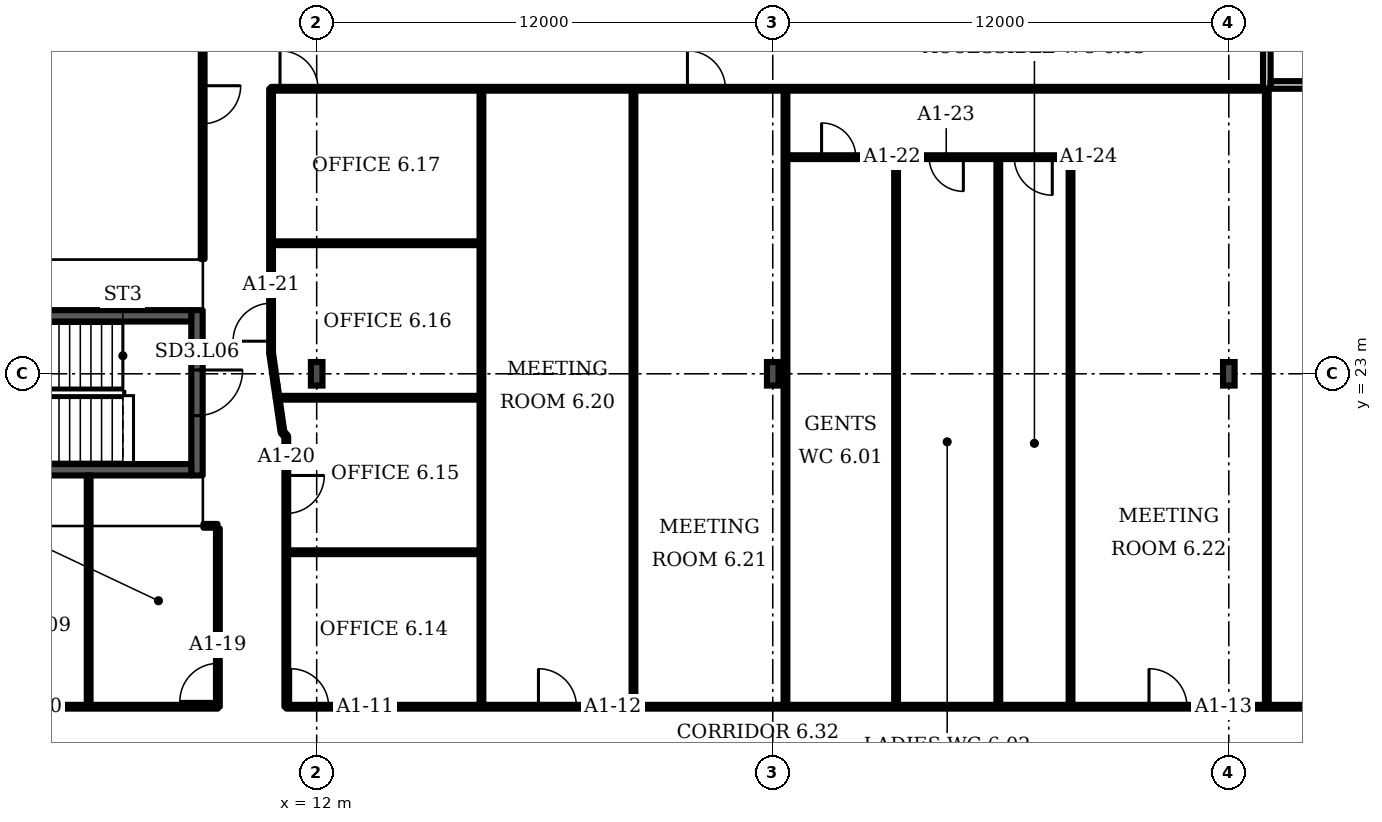
"""IFC4 building model, lengths in metres.
Left out: names, types, materials, properties, quantities, classifications, styles, units other than length and angle.
Written with IfcOpenShell. Run it as: python <this file> out.ifc"""

import sys

from ifc_helpers import new_model, si_unit, direction, frame, frame_2d, origin, origin_2d, place, context, subcontext, project, spatial, rectangle, i_section, extrude, element, fill, save


model = new_model("IFC4")
c1 = context("Model", 3, precision=1e-05, world=origin(), true_north=direction((0.0, 1.0)))
c2 = subcontext(c1, "Body", "Model", "MODEL_VIEW")
j1 = project(units=[si_unit("LENGTHUNIT", "METRE"), si_unit("PLANEANGLEUNIT", "RADIAN")], contexts=[c1])
p1 = place(None, origin())
s1 = spatial("IfcSite", under=j1, at=p1, CompositionType="ELEMENT")
p2 = place(p1, origin())
s2 = spatial("IfcBuilding", under=s1, at=p2, CompositionType="ELEMENT")
p3 = place(p2, frame((0.0, 0.0, 41.5)))
s3 = spatial("IfcBuildingStorey", under=s2, at=p3, CompositionType="ELEMENT", Elevation=41.5)
for number, where, z_axis, x_axis in (
    (1, (12.0, 23.0, 0.0), (0.0, 0.0, 1.0), (1.0, 0.0, 0.0)),
    (2, (24.0, 23.0, 0.0), (0.0, 0.0, 1.0), (1.0, 0.0, 0.0)),
    (3, (36.0, 23.0, 0.0), (0.0, 0.0, 1.0), (1.0, 0.0, 0.0)),
):
    element("IfcColumn", number, at=place(p3, frame(where, z_axis=z_axis, x_axis=x_axis)), inside=s3, PredefinedType="COLUMN", context=c2, shape_type="SweptSolid", body=[
        extrude(i_section(OverallWidth=0.305, OverallDepth=0.62, WebThickness=0.021, FlangeThickness=0.04, FilletRadius=0.027, at=origin_2d()), origin(), (0.0, 0.0, 1.0), 3.6),
    ])
p4 = place(p3, frame((37.0, 30.5, 0.0), z_axis=(0.0, 0.0, 1.0), x_axis=(0.0, 1.0, 0.0)))
e4 = element("IfcWall", 4, at=p4, inside=s3, PredefinedType="PARTITIONING", context=c2, shape_type="SweptSolid", body=[
    extrude(rectangle(XDim=3.5, YDim=0.2, at=frame_2d((1.75, 0.0))), origin(), (0.0, 0.0, 1.0), 3.2),
])
p5 = place(p4, frame((1.2, 0.0, 0.0)))
e5 = element("IfcOpeningElement", 5, at=p5, cuts=e4, PredefinedType="OPENING", context=c2, shape_type="SweptSolid", body=[
    extrude(rectangle(XDim=1.1, YDim=2.1, at=frame_2d((0.55, 1.05))), frame((0.0, 0.11, 0.0), z_axis=(0.0, -1.0, 0.0), x_axis=(1.0, 0.0, 0.0)), (0.0, 0.0, 1.0), 0.22),
])
p6 = place(p3, frame((37.1, 30.6, 0.0), z_axis=(0.0, 0.0, 1.0), x_axis=(1.0, 0.0, 0.0)))
e6 = element("IfcWall", 6, at=p6, inside=s3, PredefinedType="PARTITIONING", context=c2, shape_type="SweptSolid", body=[
    extrude(rectangle(XDim=2.8, YDim=0.2, at=frame_2d((1.4, 0.0))), origin(), (0.0, 0.0, 1.0), 3.2),
])
p7 = place(p3, frame((8.85, 20.325, 0.0), z_axis=(0.0, 0.0, 1.0), x_axis=(0.0, 1.0, 0.0)))
e7 = element("IfcWall", 7, at=p7, inside=s3, PredefinedType="SHEAR", context=c2, shape_type="SweptSolid", body=[
    extrude(rectangle(XDim=4.35, YDim=0.3, at=frame_2d((2.175, 0.0))), origin(), (0.0, 0.0, 1.0), 3.2),
])
p8 = place(p7, frame((1.575, 0.0, 0.0)))
e8 = element("IfcOpeningElement", 8, at=p8, cuts=e7, PredefinedType="OPENING", context=c2, shape_type="SweptSolid", body=[
    extrude(rectangle(XDim=1.2, YDim=2.1, at=frame_2d((0.6, 1.05))), frame((0.0, 0.16, 0.0), z_axis=(0.0, -1.0, 0.0), x_axis=(1.0, 0.0, 0.0)), (0.0, 0.0, 1.0), 0.32),
])
p9 = place(p3, frame((0.02, 14.24, 0.0), z_axis=(0.0, 0.0, 1.0), x_axis=(1.0, 0.0, 0.0)))
e9 = element("IfcWall", 9, at=p9, inside=s3, PredefinedType="PARTITIONING", context=c2, shape_type="SweptSolid", body=[
    extrude(rectangle(XDim=9.38, YDim=0.1, at=frame_2d((4.69, 0.0))), origin(), (0.0, 0.0, 1.0), 3.2),
])
p10 = place(p9, frame((2.56, 0.0, 0.0)))
e10 = element("IfcOpeningElement", 10, at=p10, cuts=e9, PredefinedType="OPENING", context=c2, shape_type="SweptSolid", body=[
    extrude(rectangle(XDim=1.0, YDim=2.1, at=frame_2d((0.5, 1.05))), frame((0.0, 0.06, 0.0), z_axis=(0.0, -1.0, 0.0), x_axis=(1.0, 0.0, 0.0)), (0.0, 0.0, 1.0), 0.12),
])
p11 = place(p3, frame((6.0, 14.24, 0.0), z_axis=(0.0, 0.0, 1.0), x_axis=(0.0, 1.0, 0.0)))
e11 = element("IfcWall", 11, at=p11, inside=s3, PredefinedType="PARTITIONING", context=c2, shape_type="SweptSolid", body=[
    extrude(rectangle(XDim=6.085, YDim=0.1, at=frame_2d((3.042, 0.0))), origin(), (0.0, 0.0, 1.0), 3.2),
])
p12 = place(p3, frame((9.0, 26.02, 0.0), z_axis=(0.0, 0.0, 1.0), x_axis=(0.0, 1.0, 0.0)))
e12 = element("IfcWall", 12, at=p12, inside=s3, PredefinedType="PARTITIONING", context=c2, shape_type="SweptSolid", body=[
    extrude(rectangle(XDim=7.96, YDim=0.1, at=frame_2d((3.98, 0.0))), origin(), (0.0, 0.0, 1.0), 3.2),
])
p13 = place(p12, frame((3.56, 0.0, 0.0)))
e13 = element("IfcOpeningElement", 13, at=p13, cuts=e12, PredefinedType="OPENING", context=c2, shape_type="SweptSolid", body=[
    extrude(rectangle(XDim=1.0, YDim=2.1, at=frame_2d((0.5, 1.05))), frame((0.0, 0.06, 0.0), z_axis=(0.0, -1.0, 0.0), x_axis=(1.0, 0.0, 0.0)), (0.0, 0.0, 1.0), 0.12),
])
p14 = place(p3, frame((9.02, 19.0, 0.0), z_axis=(0.0, 0.0, 1.0), x_axis=(1.0, 0.0, 0.0)))
e14 = element("IfcWall", 14, at=p14, inside=s3, PredefinedType="PARTITIONING", context=c2, shape_type="SweptSolid", body=[
    extrude(rectangle(XDim=0.37, YDim=0.1, at=frame_2d((0.185, 0.0))), origin(), (0.0, 0.0, 1.0), 3.2),
])
p15 = place(p3, frame((9.4, 14.24, 0.0), z_axis=(0.0, 0.0, 1.0), x_axis=(0.0, 1.0, 0.0)))
e15 = element("IfcWall", 15, at=p15, inside=s3, PredefinedType="PARTITIONING", context=c2, shape_type="SweptSolid", body=[
    extrude(rectangle(XDim=4.69, YDim=0.1, at=frame_2d((2.345, 0.0))), origin(), (0.0, 0.0, 1.0), 3.2),
])
p16 = place(p15, frame((0.14, 0.0, 0.0)))
e16 = element("IfcOpeningElement", 16, at=p16, cuts=e15, PredefinedType="OPENING", context=c2, shape_type="SweptSolid", body=[
    extrude(rectangle(XDim=1.0, YDim=2.1, at=frame_2d((0.5, 1.05))), frame((0.0, 0.06, 0.0), z_axis=(0.0, -1.0, 0.0), x_axis=(1.0, 0.0, 0.0)), (0.0, 0.0, 1.0), 0.12),
])
p17 = place(p3, frame((10.8, 23.55, 0.0), z_axis=(0.0, 0.0, 1.0), x_axis=(0.0, 1.0, 0.0)))
e17 = element("IfcWall", 17, at=p17, inside=s3, PredefinedType="PARTITIONING", context=c2, shape_type="SweptSolid", body=[
    extrude(rectangle(XDim=6.95, YDim=0.1, at=frame_2d((3.475, 0.0))), origin(), (0.0, 0.0, 1.0), 3.2),
])
p18 = place(p17, frame((0.308, 0.0, 0.0)))
e18 = element("IfcOpeningElement", 18, at=p18, cuts=e17, PredefinedType="OPENING", context=c2, shape_type="SweptSolid", body=[
    extrude(rectangle(XDim=1.0, YDim=2.1, at=frame_2d((0.5, 1.05))), frame((0.0, 0.06, 0.0), z_axis=(0.0, -1.0, 0.0), x_axis=(1.0, 0.0, 0.0)), (0.0, 0.0, 1.0), 0.12),
])
p19 = place(p3, frame((10.8, 26.435, 0.0), z_axis=(0.0, 0.0, 1.0), x_axis=(1.0, 0.0, 0.0)))
e19 = element("IfcWall", 19, at=p19, inside=s3, PredefinedType="PARTITIONING", context=c2, shape_type="SweptSolid", body=[
    extrude(rectangle(XDim=5.535, YDim=0.1, at=frame_2d((2.768, 0.0))), origin(), (0.0, 0.0, 1.0), 3.2),
])
p20 = place(p3, frame((10.8, 30.5, 0.0), z_axis=(0.0, 0.0, 1.0), x_axis=(1.0, 0.0, 0.0)))
e20 = element("IfcWall", 20, at=p20, inside=s3, PredefinedType="PARTITIONING", context=c2, shape_type="SweptSolid", body=[
    extrude(rectangle(XDim=26.05, YDim=0.1, at=frame_2d((13.025, 0.0))), origin(), (0.0, 0.0, 1.0), 3.2),
])
p21 = place(p20, frame((0.235, 0.0, 0.0)))
e21 = element("IfcOpeningElement", 21, at=p21, cuts=e20, PredefinedType="OPENING", context=c2, shape_type="SweptSolid", body=[
    extrude(rectangle(XDim=1.0, YDim=2.1, at=frame_2d((0.5, 1.05))), frame((0.0, 0.06, 0.0), z_axis=(0.0, -1.0, 0.0), x_axis=(1.0, 0.0, 0.0)), (0.0, 0.0, 1.0), 0.12),
])
p22 = place(p20, frame((10.955, 0.0, 0.0)))
e22 = element("IfcOpeningElement", 22, at=p22, cuts=e20, PredefinedType="OPENING", context=c2, shape_type="SweptSolid", body=[
    extrude(rectangle(XDim=1.0, YDim=2.1, at=frame_2d((0.5, 1.05))), frame((0.0, 0.06, 0.0), z_axis=(0.0, -1.0, 0.0), x_axis=(1.0, 0.0, 0.0)), (0.0, 0.0, 1.0), 0.12),
])
p23 = place(p3, frame((10.92, 22.705, 0.0), z_axis=(0.0, 0.0, 1.0), x_axis=(-0.14046, 0.990086, 0.0)))
e23 = element("IfcWall", 23, at=p23, inside=s3, PredefinedType="PARTITIONING", context=c2, shape_type="SweptSolid", body=[
    extrude(rectangle(XDim=0.854, YDim=0.1, at=frame_2d((0.427, 0.0))), origin(), (0.0, 0.0, 1.0), 3.2),
])
p24 = place(p3, frame((10.97, 22.37, 0.0), z_axis=(0.0, 0.0, 1.0), x_axis=(-0.147776, 0.989018, 0.0)))
e24 = element("IfcWall", 24, at=p24, inside=s3, PredefinedType="PARTITIONING", context=c2, shape_type="SweptSolid", body=[
    extrude(rectangle(XDim=0.339, YDim=0.1, at=frame_2d((0.169, 0.0))), origin(), (0.0, 0.0, 1.0), 3.2),
])
p25 = place(p3, frame((10.97, 22.37, 0.0), z_axis=(0.0, 0.0, 1.0), x_axis=(1.0, 0.0, 0.0)))
e25 = element("IfcWall", 25, at=p25, inside=s3, PredefinedType="PARTITIONING", context=c2, shape_type="SweptSolid", body=[
    extrude(rectangle(XDim=5.365, YDim=0.1, at=frame_2d((2.683, 0.0))), origin(), (0.0, 0.0, 1.0), 3.2),
])
p26 = place(p3, frame((11.1, 21.465, 0.0), z_axis=(0.0, 0.0, 1.0), x_axis=(-0.142318, 0.989818, 0.0)))
e26 = element("IfcWall", 26, at=p26, inside=s3, PredefinedType="PARTITIONING", context=c2, shape_type="SweptSolid", body=[
    extrude(rectangle(XDim=0.914, YDim=0.1, at=frame_2d((0.457, 0.0))), origin(), (0.0, 0.0, 1.0), 3.2),
])
p27 = place(p3, frame((11.2, 14.24, 0.0), z_axis=(0.0, 0.0, 1.0), x_axis=(0.0, 1.0, 0.0)))
e27 = element("IfcWall", 27, at=p27, inside=s3, PredefinedType="PARTITIONING", context=c2, shape_type="SweptSolid", body=[
    extrude(rectangle(XDim=7.11, YDim=0.1, at=frame_2d((3.555, 0.0))), origin(), (0.0, 0.0, 1.0), 3.2),
])
p28 = place(p27, frame((5.085, 0.0, 0.0)))
e28 = element("IfcOpeningElement", 28, at=p28, cuts=e27, PredefinedType="OPENING", context=c2, shape_type="SweptSolid", body=[
    extrude(rectangle(XDim=1.0, YDim=2.1, at=frame_2d((0.5, 1.05))), frame((0.0, 0.06, 0.0), z_axis=(0.0, -1.0, 0.0), x_axis=(1.0, 0.0, 0.0)), (0.0, 0.0, 1.0), 0.12),
])
p29 = place(p3, frame((11.2, 14.24, 0.0), z_axis=(0.0, 0.0, 1.0), x_axis=(1.0, 0.0, 0.0)))
e29 = element("IfcWall", 29, at=p29, inside=s3, PredefinedType="PARTITIONING", context=c2, shape_type="SweptSolid", body=[
    extrude(rectangle(XDim=51.635, YDim=0.1, at=frame_2d((25.817, 0.0))), origin(), (0.0, 0.0, 1.0), 3.2),
])
p30 = place(p29, frame((0.115, 0.0, 0.0)))
e30 = element("IfcOpeningElement", 30, at=p30, cuts=e29, PredefinedType="OPENING", context=c2, shape_type="SweptSolid", body=[
    extrude(rectangle(XDim=1.0, YDim=2.1, at=frame_2d((0.5, 1.05))), frame((0.0, 0.06, 0.0), z_axis=(0.0, -1.0, 0.0), x_axis=(1.0, 0.0, 0.0)), (0.0, 0.0, 1.0), 0.12),
])
p31 = place(p29, frame((6.635, 0.0, 0.0)))
e31 = element("IfcOpeningElement", 31, at=p31, cuts=e29, PredefinedType="OPENING", context=c2, shape_type="SweptSolid", body=[
    extrude(rectangle(XDim=1.0, YDim=2.1, at=frame_2d((0.5, 1.05))), frame((0.0, 0.06, 0.0), z_axis=(0.0, -1.0, 0.0), x_axis=(1.0, 0.0, 0.0)), (0.0, 0.0, 1.0), 0.12),
])
p32 = place(p29, frame((22.7, 0.0, 0.0)))
e32 = element("IfcOpeningElement", 32, at=p32, cuts=e29, PredefinedType="OPENING", context=c2, shape_type="SweptSolid", body=[
    extrude(rectangle(XDim=1.0, YDim=2.1, at=frame_2d((0.5, 1.05))), frame((0.0, 0.06, 0.0), z_axis=(0.0, -1.0, 0.0), x_axis=(1.0, 0.0, 0.0)), (0.0, 0.0, 1.0), 0.12),
])
p33 = place(p29, frame((27.865, 0.0, 0.0)))
e33 = element("IfcOpeningElement", 33, at=p33, cuts=e29, PredefinedType="OPENING", context=c2, shape_type="SweptSolid", body=[
    extrude(rectangle(XDim=1.0, YDim=2.1, at=frame_2d((0.5, 1.05))), frame((0.0, 0.06, 0.0), z_axis=(0.0, -1.0, 0.0), x_axis=(1.0, 0.0, 0.0)), (0.0, 0.0, 1.0), 0.12),
])
p34 = place(p29, frame((34.065, 0.0, 0.0)))
e34 = element("IfcOpeningElement", 34, at=p34, cuts=e29, PredefinedType="OPENING", context=c2, shape_type="SweptSolid", body=[
    extrude(rectangle(XDim=1.8, YDim=2.1, at=frame_2d((0.9, 1.05))), frame((0.0, 0.06, 0.0), z_axis=(0.0, -1.0, 0.0), x_axis=(1.0, 0.0, 0.0)), (0.0, 0.0, 1.0), 0.12),
])
p35 = place(p29, frame((41.765, 0.0, 0.0)))
e35 = element("IfcOpeningElement", 35, at=p35, cuts=e29, PredefinedType="OPENING", context=c2, shape_type="SweptSolid", body=[
    extrude(rectangle(XDim=1.8, YDim=2.1, at=frame_2d((0.9, 1.05))), frame((0.0, 0.06, 0.0), z_axis=(0.0, -1.0, 0.0), x_axis=(1.0, 0.0, 0.0)), (0.0, 0.0, 1.0), 0.12),
])
p36 = place(p3, frame((11.2, 18.305, 0.0), z_axis=(0.0, 0.0, 1.0), x_axis=(1.0, 0.0, 0.0)))
e36 = element("IfcWall", 36, at=p36, inside=s3, PredefinedType="PARTITIONING", context=c2, shape_type="SweptSolid", body=[
    extrude(rectangle(XDim=5.135, YDim=0.1, at=frame_2d((2.567, 0.0))), origin(), (0.0, 0.0, 1.0), 3.2),
])
p37 = place(p3, frame((11.2, 21.35, 0.0), z_axis=(0.0, 0.0, 1.0), x_axis=(-0.65566, 0.755051, 0.0)))
e37 = element("IfcWall", 37, at=p37, inside=s3, PredefinedType="PARTITIONING", context=c2, shape_type="SweptSolid", body=[
    extrude(rectangle(XDim=0.152, YDim=0.1, at=frame_2d((0.076, 0.0))), origin(), (0.0, 0.0, 1.0), 3.2),
])
for number, where, z_axis, x_axis in (
    (38, (16.335, 14.24, 0.0), (0.0, 0.0, 1.0), (0.0, 1.0, 0.0)),
    (39, (20.335, 14.24, 0.0), (0.0, 0.0, 1.0), (0.0, 1.0, 0.0)),
):
    element("IfcWall", number, at=place(p3, frame(where, z_axis=z_axis, x_axis=x_axis)), inside=s3, PredefinedType="PARTITIONING", context=c2, shape_type="SweptSolid", body=[
        extrude(rectangle(XDim=16.26, YDim=0.1, at=frame_2d((8.13, 0.0))), origin(), (0.0, 0.0, 1.0), 3.2),
    ])
p38 = place(p3, frame((24.335, 14.24, 0.0), z_axis=(0.0, 0.0, 1.0), x_axis=(0.0, 1.0, 0.0)))
e40 = element("IfcWall", 40, at=p38, inside=s3, PredefinedType="PARTITIONING", context=c2, shape_type="SweptSolid", body=[
    extrude(rectangle(XDim=16.25, YDim=0.1, at=frame_2d((8.125, 0.0))), origin(), (0.0, 0.0, 1.0), 3.2),
])
p39 = place(p3, frame((24.335, 28.7, 0.0), z_axis=(0.0, 0.0, 1.0), x_axis=(1.0, 0.0, 0.0)))
e41 = element("IfcWall", 41, at=p39, inside=s3, PredefinedType="PARTITIONING", context=c2, shape_type="SweptSolid", body=[
    extrude(rectangle(XDim=7.5, YDim=0.1, at=frame_2d((3.75, 0.0))), origin(), (0.0, 0.0, 1.0), 3.2),
])
p40 = place(p39, frame((0.95, 0.0, 0.0)))
e42 = element("IfcOpeningElement", 42, at=p40, cuts=e41, PredefinedType="OPENING", context=c2, shape_type="SweptSolid", body=[
    extrude(rectangle(XDim=0.9, YDim=2.1, at=frame_2d((0.45, 1.05))), frame((0.0, 0.06, 0.0), z_axis=(0.0, -1.0, 0.0), x_axis=(1.0, 0.0, 0.0)), (0.0, 0.0, 1.0), 0.12),
])
p41 = place(p39, frame((3.78, 0.0, 0.0)))
e43 = element("IfcOpeningElement", 43, at=p41, cuts=e41, PredefinedType="OPENING", context=c2, shape_type="SweptSolid", body=[
    extrude(rectangle(XDim=0.9, YDim=2.1, at=frame_2d((0.45, 1.05))), frame((0.0, 0.06, 0.0), z_axis=(0.0, -1.0, 0.0), x_axis=(1.0, 0.0, 0.0)), (0.0, 0.0, 1.0), 0.12),
])
p42 = place(p39, frame((6.02, 0.0, 0.0)))
e44 = element("IfcOpeningElement", 44, at=p42, cuts=e41, PredefinedType="OPENING", context=c2, shape_type="SweptSolid", body=[
    extrude(rectangle(XDim=1.0, YDim=2.1, at=frame_2d((0.5, 1.05))), frame((0.0, 0.06, 0.0), z_axis=(0.0, -1.0, 0.0), x_axis=(1.0, 0.0, 0.0)), (0.0, 0.0, 1.0), 0.12),
])
for number, where, z_axis, x_axis in (
    (45, (27.245, 14.24, 0.0), (0.0, 0.0, 1.0), (0.0, 1.0, 0.0)),
    (46, (29.935, 14.24, 0.0), (0.0, 0.0, 1.0), (0.0, 1.0, 0.0)),
    (47, (31.835, 14.24, 0.0), (0.0, 0.0, 1.0), (0.0, 1.0, 0.0)),
):
    element("IfcWall", number, at=place(p3, frame(where, z_axis=z_axis, x_axis=x_axis)), inside=s3, PredefinedType="PARTITIONING", context=c2, shape_type="SweptSolid", body=[
        extrude(rectangle(XDim=14.46, YDim=0.1, at=frame_2d((7.23, 0.0))), origin(), (0.0, 0.0, 1.0), 3.2),
    ])
p43 = place(p3, frame((37.0, 14.24, 0.0), z_axis=(0.0, 0.0, 1.0), x_axis=(0.0, 1.0, 0.0)))
e48 = element("IfcWall", 48, at=p43, inside=s3, PredefinedType="PARTITIONING", context=c2, shape_type="SweptSolid", body=[
    extrude(rectangle(XDim=16.26, YDim=0.1, at=frame_2d((8.13, 0.0))), origin(), (0.0, 0.0, 1.0), 3.2),
])
for number, where, z_axis, x_axis in (
    (49, (1.2, 20.475, 0.0), (0.0, 0.0, 1.0), (1.0, 0.0, 0.0)),
    (50, (1.2, 24.525, 0.0), (0.0, 0.0, 1.0), (1.0, 0.0, 0.0)),
):
    element("IfcWall", number, at=place(p3, frame(where, z_axis=z_axis, x_axis=x_axis)), inside=s3, PredefinedType="SHEAR", context=c2, shape_type="SweptSolid", body=[
        extrude(rectangle(XDim=7.5, YDim=0.3, at=frame_2d((3.75, 0.0))), origin(), (0.0, 0.0, 1.0), 3.2),
    ])
p44 = place(p8, origin())
e51 = element("IfcDoor", 51, at=p44, inside=s3, OperationType="SINGLE_SWING_RIGHT", PredefinedType="DOOR", context=c2, shape_type="SweptSolid", body=[
    extrude(rectangle(XDim=1.2, YDim=2.1, at=frame_2d((0.6, 1.05))), frame((0.0, 0.025, 0.0), z_axis=(0.0, -1.0, 0.0), x_axis=(1.0, 0.0, 0.0)), (0.0, 0.0, 1.0), 0.05),
])
fill(e8, e51)
p45 = place(p30, origin())
e52 = element("IfcDoor", 52, at=p45, inside=s3, OperationType="SINGLE_SWING_LEFT", PredefinedType="DOOR", context=c2, shape_type="SweptSolid", body=[
    extrude(rectangle(XDim=1.0, YDim=2.1, at=frame_2d((0.5, 1.05))), frame((0.0, 0.025, 0.0), z_axis=(0.0, -1.0, 0.0), x_axis=(1.0, 0.0, 0.0)), (0.0, 0.0, 1.0), 0.05),
])
fill(e30, e52)
p46 = place(p31, origin())
e53 = element("IfcDoor", 53, at=p46, inside=s3, OperationType="SINGLE_SWING_LEFT", PredefinedType="DOOR", context=c2, shape_type="SweptSolid", body=[
    extrude(rectangle(XDim=1.0, YDim=2.1, at=frame_2d((0.5, 1.05))), frame((0.0, 0.025, 0.0), z_axis=(0.0, -1.0, 0.0), x_axis=(1.0, 0.0, 0.0)), (0.0, 0.0, 1.0), 0.05),
])
fill(e31, e53)
p47 = place(p32, origin())
e54 = element("IfcDoor", 54, at=p47, inside=s3, OperationType="SINGLE_SWING_LEFT", PredefinedType="DOOR", context=c2, shape_type="SweptSolid", body=[
    extrude(rectangle(XDim=1.0, YDim=2.1, at=frame_2d((0.5, 1.05))), frame((0.0, 0.025, 0.0), z_axis=(0.0, -1.0, 0.0), x_axis=(1.0, 0.0, 0.0)), (0.0, 0.0, 1.0), 0.05),
])
fill(e32, e54)
p48 = place(p16, origin())
e55 = element("IfcDoor", 55, at=p48, inside=s3, OperationType="SINGLE_SWING_LEFT", PredefinedType="DOOR", context=c2, shape_type="SweptSolid", body=[
    extrude(rectangle(XDim=1.0, YDim=2.1, at=frame_2d((0.5, 1.05))), frame((0.0, 0.025, 0.0), z_axis=(0.0, -1.0, 0.0), x_axis=(1.0, 0.0, 0.0)), (0.0, 0.0, 1.0), 0.05),
])
fill(e16, e55)
p49 = place(p28, origin())
e56 = element("IfcDoor", 56, at=p49, inside=s3, OperationType="SINGLE_SWING_RIGHT", PredefinedType="DOOR", context=c2, shape_type="SweptSolid", body=[
    extrude(rectangle(XDim=1.0, YDim=2.1, at=frame_2d((0.5, 1.05))), frame((0.0, 0.025, 0.0), z_axis=(0.0, -1.0, 0.0), x_axis=(1.0, 0.0, 0.0)), (0.0, 0.0, 1.0), 0.05),
])
fill(e28, e56)
p50 = place(p18, origin())
e57 = element("IfcDoor", 57, at=p50, inside=s3, OperationType="SINGLE_SWING_LEFT", PredefinedType="DOOR", context=c2, shape_type="SweptSolid", body=[
    extrude(rectangle(XDim=1.0, YDim=2.1, at=frame_2d((0.5, 1.05))), frame((0.0, 0.025, 0.0), z_axis=(0.0, -1.0, 0.0), x_axis=(1.0, 0.0, 0.0)), (0.0, 0.0, 1.0), 0.05),
])
fill(e18, e57)
p51 = place(p40, origin())
e58 = element("IfcDoor", 58, at=p51, inside=s3, OperationType="SINGLE_SWING_LEFT", PredefinedType="DOOR", context=c2, shape_type="SweptSolid", body=[
    extrude(rectangle(XDim=0.9, YDim=2.1, at=frame_2d((0.45, 1.05))), frame((0.0, 0.025, 0.0), z_axis=(0.0, -1.0, 0.0), x_axis=(1.0, 0.0, 0.0)), (0.0, 0.0, 1.0), 0.05),
])
fill(e42, e58)
p52 = place(p41, origin())
e59 = element("IfcDoor", 59, at=p52, inside=s3, OperationType="SINGLE_SWING_RIGHT", PredefinedType="DOOR", context=c2, shape_type="SweptSolid", body=[
    extrude(rectangle(XDim=0.9, YDim=2.1, at=frame_2d((0.45, 1.05))), frame((0.0, 0.025, 0.0), z_axis=(0.0, -1.0, 0.0), x_axis=(1.0, 0.0, 0.0)), (0.0, 0.0, 1.0), 0.05),
])
fill(e43, e59)
p53 = place(p42, origin())
e60 = element("IfcDoor", 60, at=p53, inside=s3, OperationType="SINGLE_SWING_RIGHT", PredefinedType="DOOR", context=c2, shape_type="SweptSolid", body=[
    extrude(rectangle(XDim=1.0, YDim=2.1, at=frame_2d((0.5, 1.05))), frame((0.0, 0.025, 0.0), z_axis=(0.0, -1.0, 0.0), x_axis=(1.0, 0.0, 0.0)), (0.0, 0.0, 1.0), 0.05),
])
fill(e44, e60)
p54 = place(p13, origin())
e61 = element("IfcDoor", 61, at=p54, inside=s3, OperationType="SINGLE_SWING_RIGHT", PredefinedType="DOOR", context=c2, shape_type="SweptSolid", body=[
    extrude(rectangle(XDim=1.0, YDim=2.1, at=frame_2d((0.5, 1.05))), frame((0.0, 0.025, 0.0), z_axis=(0.0, -1.0, 0.0), x_axis=(1.0, 0.0, 0.0)), (0.0, 0.0, 1.0), 0.05),
])
fill(e13, e61)
p55 = place(p21, origin())
e62 = element("IfcDoor", 62, at=p55, inside=s3, OperationType="SINGLE_SWING_LEFT", PredefinedType="DOOR", context=c2, shape_type="SweptSolid", body=[
    extrude(rectangle(XDim=1.0, YDim=2.1, at=frame_2d((0.5, 1.05))), frame((0.0, 0.025, 0.0), z_axis=(0.0, -1.0, 0.0), x_axis=(1.0, 0.0, 0.0)), (0.0, 0.0, 1.0), 0.05),
])
fill(e21, e62)
p56 = place(p22, origin())
e63 = element("IfcDoor", 63, at=p56, inside=s3, OperationType="SINGLE_SWING_LEFT", PredefinedType="DOOR", context=c2, shape_type="SweptSolid", body=[
    extrude(rectangle(XDim=1.0, YDim=2.1, at=frame_2d((0.5, 1.05))), frame((0.0, 0.025, 0.0), z_axis=(0.0, -1.0, 0.0), x_axis=(1.0, 0.0, 0.0)), (0.0, 0.0, 1.0), 0.05),
])
fill(e22, e63)
save(model, sys.argv[1])
